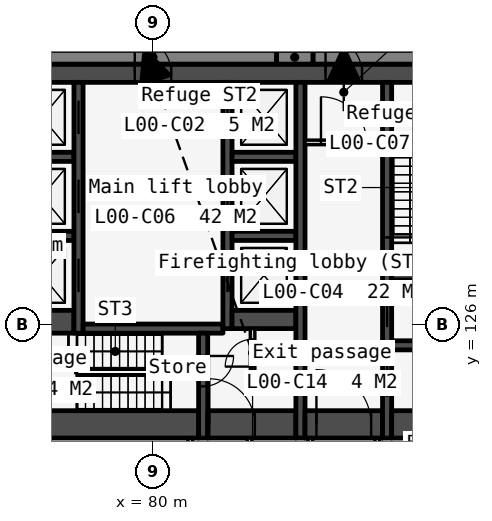
"""IFC4 building model, lengths in metres.
Left out: names, types, materials, properties, quantities, classifications, styles, units other than length and angle.
Written with IfcOpenShell. Run it as: python <this file> out.ifc"""

import sys

from ifc_helpers import new_model, si_unit, direction, frame, frame_2d, origin, place, context, subcontext, project, spatial, polyline, rectangle, outline, extrude, element, fill, save


model = new_model("IFC4")
c1 = context("Model", 3, precision=1e-05, world=origin(), true_north=direction((0.0, 1.0)))
c2 = subcontext(c1, "Body", "Model", "MODEL_VIEW")
j1 = project(units=[si_unit("LENGTHUNIT", "METRE"), si_unit("PLANEANGLEUNIT", "RADIAN")], contexts=[c1])
p1 = place(None, origin())
s1 = spatial("IfcSite", under=j1, at=p1, CompositionType="ELEMENT")
p2 = place(p1, origin())
s2 = spatial("IfcBuilding", under=s1, at=p2, CompositionType="ELEMENT")
p3 = place(p2, origin())
s3 = spatial("IfcBuildingStorey", under=s2, at=p3, CompositionType="ELEMENT", Elevation=0.0)
p4 = place(p3, frame((66.0, 134.25, 0.0), z_axis=(0.0, 0.0, 1.0), x_axis=(1.0, 0.0, 0.0)))
e1 = element("IfcWall", 1, at=p4, inside=s3, PredefinedType="SOLIDWALL", context=c2, shape_type="SweptSolid", body=[
    extrude(rectangle(XDim=28.0, YDim=0.6, at=frame_2d((14.0, 0.0))), origin(), (0.0, 0.0, 1.0), 7.2),
])
p5 = place(p4, frame((7.125, 0.0, 0.0)))
e2 = element("IfcOpeningElement", 2, at=p5, cuts=e1, PredefinedType="OPENING", context=c2, shape_type="SweptSolid", body=[
    extrude(rectangle(XDim=1.2, YDim=2.1, at=frame_2d((0.6, 1.05))), frame((0.0, 0.31, 0.0), z_axis=(0.0, -1.0, 0.0), x_axis=(1.0, 0.0, 0.0)), (0.0, 0.0, 1.0), 0.62),
])
p6 = place(p4, frame((19.675, 0.0, 0.0)))
e3 = element("IfcOpeningElement", 3, at=p6, cuts=e1, PredefinedType="OPENING", context=c2, shape_type="SweptSolid", body=[
    extrude(rectangle(XDim=1.2, YDim=2.1, at=frame_2d((0.6, 1.05))), frame((0.0, 0.31, 0.0), z_axis=(0.0, -1.0, 0.0), x_axis=(1.0, 0.0, 0.0)), (0.0, 0.0, 1.0), 0.62),
])
p7 = place(p4, frame((13.4, 0.0, 0.0)))
e4 = element("IfcOpeningElement", 4, at=p7, cuts=e1, PredefinedType="OPENING", context=c2, shape_type="SweptSolid", body=[
    extrude(rectangle(XDim=1.2, YDim=2.1, at=frame_2d((0.6, 1.05))), frame((0.0, 0.31, 0.0), z_axis=(0.0, -1.0, 0.0), x_axis=(1.0, 0.0, 0.0)), (0.0, 0.0, 1.0), 0.62),
])
for number, where, z_axis, x_axis in (
    (5, (75.3, 131.5, 0.0), (0.0, 0.0, 1.0), (1.0, 0.0, 0.0)),
    (6, (75.3, 128.9, 0.0), (0.0, 0.0, 1.0), (1.0, 0.0, 0.0)),
):
    element("IfcWall", number, at=place(p3, frame(where, z_axis=z_axis, x_axis=x_axis)), inside=s3, PredefinedType="SOLIDWALL", context=c2, shape_type="SweptSolid", body=[
        extrude(rectangle(XDim=2.1, YDim=0.3, at=frame_2d((1.05, 0.0))), origin(), (0.0, 0.0, 1.0), 7.2),
    ])
p8 = place(p3, frame((75.3, 126.075, 0.0), z_axis=(0.0, 0.0, 1.0), x_axis=(1.0, 0.0, 0.0)))
e7 = element("IfcWall", 7, at=p8, inside=s3, PredefinedType="SOLIDWALL", context=c2, shape_type="SweptSolid", body=[
    extrude(rectangle(XDim=2.1, YDim=0.75, at=frame_2d((1.05, 0.0))), origin(), (0.0, 0.0, 1.0), 7.2),
])
p9 = place(p3, frame((75.3, 122.7, 0.0), z_axis=(0.0, 0.0, 1.0), x_axis=(1.0, 0.0, 0.0)))
e8 = element("IfcWall", 8, at=p9, inside=s3, PredefinedType="SOLIDWALL", context=c2, shape_type="SweptSolid", body=[
    extrude(rectangle(XDim=6.2, YDim=0.9, at=frame_2d((3.1, 0.0))), origin(), (0.0, 0.0, 1.0), 7.2),
])
p10 = place(p3, frame((77.55, 133.95, 0.0), z_axis=(0.0, 0.0, 1.0), x_axis=(0.0, -1.0, 0.0)))
e9 = element("IfcWall", 9, at=p10, inside=s3, PredefinedType="SOLIDWALL", context=c2, shape_type="SweptSolid", body=[
    extrude(rectangle(XDim=8.25, YDim=0.3, at=frame_2d((4.125, 0.0))), origin(), (0.0, 0.0, 1.0), 7.2),
])
p11 = place(p10, frame((0.6, 0.0, 0.0)))
e10 = element("IfcOpeningElement", 10, at=p11, cuts=e9, PredefinedType="OPENING", context=c2, shape_type="SweptSolid", body=[
    extrude(rectangle(XDim=1.1, YDim=2.1, at=frame_2d((0.55, 1.05))), frame((0.0, 0.16, 0.0), z_axis=(0.0, -1.0, 0.0), x_axis=(1.0, 0.0, 0.0)), (0.0, 0.0, 1.0), 0.32),
])
p12 = place(p10, frame((3.2, 0.0, 0.0)))
e11 = element("IfcOpeningElement", 11, at=p12, cuts=e9, PredefinedType="OPENING", context=c2, shape_type="SweptSolid", body=[
    extrude(rectangle(XDim=1.1, YDim=2.1, at=frame_2d((0.55, 1.05))), frame((0.0, 0.16, 0.0), z_axis=(0.0, -1.0, 0.0), x_axis=(1.0, 0.0, 0.0)), (0.0, 0.0, 1.0), 0.32),
])
p13 = place(p10, frame((5.8, 0.0, 0.0)))
e12 = element("IfcOpeningElement", 12, at=p13, cuts=e9, PredefinedType="OPENING", context=c2, shape_type="SweptSolid", body=[
    extrude(rectangle(XDim=1.1, YDim=2.1, at=frame_2d((0.55, 1.05))), frame((0.0, 0.16, 0.0), z_axis=(0.0, -1.0, 0.0), x_axis=(1.0, 0.0, 0.0)), (0.0, 0.0, 1.0), 0.32),
])
p14 = place(p3, frame((77.7, 125.85, 0.0), z_axis=(0.0, 0.0, 1.0), x_axis=(1.0, 0.0, 0.0)))
e13 = element("IfcWall", 13, at=p14, inside=s3, PredefinedType="SOLIDWALL", context=c2, shape_type="SweptSolid", body=[
    extrude(rectangle(XDim=4.6, YDim=0.3, at=frame_2d((2.3, 0.0))), origin(), (0.0, 0.0, 1.0), 7.2),
])
p15 = place(p3, frame((81.225, 122.25, 0.0), z_axis=(0.0, 0.0, 1.0), x_axis=(0.0, -1.0, 0.0)))
e14 = element("IfcWall", 14, at=p15, inside=s3, PredefinedType="PARTITIONING", context=c2, shape_type="SweptSolid", body=[
    extrude(rectangle(XDim=2.1, YDim=0.15, at=frame_2d((1.05, 0.0))), origin(), (0.0, 0.0, 1.0), 7.2),
])
p16 = place(p3, frame((81.65, 125.7, 0.0), z_axis=(0.0, 0.0, 1.0), x_axis=(0.0, -1.0, 0.0)))
e15 = element("IfcWall", 15, at=p16, inside=s3, PredefinedType="SOLIDWALL", context=c2, shape_type="SweptSolid", body=[
    extrude(rectangle(XDim=3.45, YDim=0.3, at=frame_2d((1.725, 0.0))), origin(), (0.0, 0.0, 1.0), 7.2),
])
p17 = place(p16, frame((0.75, 0.0, 0.0)))
e16 = element("IfcOpeningElement", 16, at=p17, cuts=e15, PredefinedType="OPENING", context=c2, shape_type="SweptSolid", body=[
    extrude(rectangle(XDim=1.0, YDim=2.1, at=frame_2d((0.5, 1.05))), frame((0.0, 0.16, 0.0), z_axis=(0.0, -1.0, 0.0), x_axis=(1.0, 0.0, 0.0)), (0.0, 0.0, 1.0), 0.32),
])
p18 = place(p3, frame((81.8, 122.7, 0.0), z_axis=(0.0, 0.0, 1.0), x_axis=(1.0, 0.0, 0.0)))
e17 = element("IfcWall", 17, at=p18, inside=s3, PredefinedType="SOLIDWALL", context=c2, shape_type="SweptSolid", body=[
    extrude(rectangle(XDim=2.9, YDim=0.9, at=frame_2d((1.45, 0.0))), origin(), (0.0, 0.0, 1.0), 7.2),
])
p19 = place(p18, frame((0.05, 0.0, 0.0)))
e18 = element("IfcOpeningElement", 18, at=p19, cuts=e17, PredefinedType="OPENING", context=c2, shape_type="SweptSolid", body=[
    extrude(rectangle(XDim=1.5, YDim=2.1, at=frame_2d((0.75, 1.05))), frame((0.0, 0.46, 0.0), z_axis=(0.0, -1.0, 0.0), x_axis=(1.0, 0.0, 0.0)), (0.0, 0.0, 1.0), 0.92),
])
p20 = place(p3, frame((82.45, 133.95, 0.0), z_axis=(0.0, 0.0, 1.0), x_axis=(0.0, -1.0, 0.0)))
e19 = element("IfcWall", 19, at=p20, inside=s3, PredefinedType="SOLIDWALL", context=c2, shape_type="SweptSolid", body=[
    extrude(rectangle(XDim=8.1, YDim=0.3, at=frame_2d((4.05, 0.0))), origin(), (0.0, 0.0, 1.0), 7.2),
])
p21 = place(p20, frame((0.6, 0.0, 0.0)))
e20 = element("IfcOpeningElement", 20, at=p21, cuts=e19, PredefinedType="OPENING", context=c2, shape_type="SweptSolid", body=[
    extrude(rectangle(XDim=1.1, YDim=2.1, at=frame_2d((0.55, 1.05))), frame((0.0, 0.16, 0.0), z_axis=(0.0, -1.0, 0.0), x_axis=(1.0, 0.0, 0.0)), (0.0, 0.0, 1.0), 0.32),
])
p22 = place(p20, frame((3.2, 0.0, 0.0)))
e21 = element("IfcOpeningElement", 21, at=p22, cuts=e19, PredefinedType="OPENING", context=c2, shape_type="SweptSolid", body=[
    extrude(rectangle(XDim=1.1, YDim=2.1, at=frame_2d((0.55, 1.05))), frame((0.0, 0.16, 0.0), z_axis=(0.0, -1.0, 0.0), x_axis=(1.0, 0.0, 0.0)), (0.0, 0.0, 1.0), 0.32),
])
p23 = place(p20, frame((5.8, 0.0, 0.0)))
e22 = element("IfcOpeningElement", 22, at=p23, cuts=e19, PredefinedType="OPENING", context=c2, shape_type="SweptSolid", body=[
    extrude(rectangle(XDim=1.1, YDim=2.1, at=frame_2d((0.55, 1.05))), frame((0.0, 0.16, 0.0), z_axis=(0.0, -1.0, 0.0), x_axis=(1.0, 0.0, 0.0)), (0.0, 0.0, 1.0), 0.32),
])
for number, where, z_axis, x_axis in (
    (23, (82.6, 131.5, 0.0), (0.0, 0.0, 1.0), (1.0, 0.0, 0.0)),
    (24, (82.6, 128.9, 0.0), (0.0, 0.0, 1.0), (1.0, 0.0, 0.0)),
):
    element("IfcWall", number, at=place(p3, frame(where, z_axis=z_axis, x_axis=x_axis)), inside=s3, PredefinedType="SOLIDWALL", context=c2, shape_type="SweptSolid", body=[
        extrude(rectangle(XDim=2.1, YDim=0.3, at=frame_2d((1.05, 0.0))), origin(), (0.0, 0.0, 1.0), 7.2),
    ])
p24 = place(p3, frame((82.6, 126.15, 0.0), z_axis=(0.0, 0.0, 1.0), x_axis=(1.0, 0.0, 0.0)))
e25 = element("IfcWall", 25, at=p24, inside=s3, PredefinedType="SOLIDWALL", context=c2, shape_type="SweptSolid", body=[
    extrude(rectangle(XDim=2.1, YDim=0.6, at=frame_2d((1.05, 0.0))), origin(), (0.0, 0.0, 1.0), 7.2),
])
p25 = place(p3, frame((83.175, 122.25, 0.0), z_axis=(0.0, 0.0, 1.0), x_axis=(0.0, -1.0, 0.0)))
e26 = element("IfcWall", 26, at=p25, inside=s3, PredefinedType="PARTITIONING", context=c2, shape_type="SweptSolid", body=[
    extrude(rectangle(XDim=2.1, YDim=0.15, at=frame_2d((1.05, 0.0))), origin(), (0.0, 0.0, 1.0), 7.2),
])
p26 = place(p3, frame((83.275, 125.85, 0.0), z_axis=(0.0, 0.0, 1.0), x_axis=(0.0, -1.0, 0.0)))
e27 = element("IfcWall", 27, at=p26, inside=s3, PredefinedType="PARTITIONING", context=c2, shape_type="SweptSolid", body=[
    extrude(rectangle(XDim=1.75, YDim=0.15, at=frame_2d((0.875, 0.0))), origin(), (0.0, 0.0, 1.0), 7.2),
])
p27 = place(p26, frame((0.35, 0.0, 0.0)))
e28 = element("IfcOpeningElement", 28, at=p27, cuts=e27, PredefinedType="OPENING", context=c2, shape_type="SweptSolid", body=[
    extrude(rectangle(XDim=0.9, YDim=2.1, at=frame_2d((0.45, 1.05))), frame((0.0, 0.085, 0.0), z_axis=(0.0, -1.0, 0.0), x_axis=(1.0, 0.0, 0.0)), (0.0, 0.0, 1.0), 0.17),
])
p28 = place(p3, frame((83.35, 124.175, 0.0), z_axis=(0.0, 0.0, 1.0), x_axis=(1.0, 0.0, 0.0)))
e29 = element("IfcWall", 29, at=p28, inside=s3, PredefinedType="PARTITIONING", context=c2, shape_type="SweptSolid", body=[
    extrude(rectangle(XDim=1.35, YDim=0.15, at=frame_2d((0.675, 0.0))), origin(), (0.0, 0.0, 1.0), 7.2),
])
p29 = place(p3, frame((84.85, 133.95, 0.0), z_axis=(0.0, 0.0, 1.0), x_axis=(0.0, -1.0, 0.0)))
e30 = element("IfcWall", 30, at=p29, inside=s3, PredefinedType="SOLIDWALL", context=c2, shape_type="SweptSolid", body=[
    extrude(rectangle(XDim=11.7, YDim=0.3, at=frame_2d((5.85, 0.0))), origin(), (0.0, 0.0, 1.0), 7.2),
])
p30 = place(p3, frame((85.0, 131.975, 0.0), z_axis=(0.0, 0.0, 1.0), x_axis=(1.0, 0.0, 0.0)))
e31 = element("IfcWall", 31, at=p30, inside=s3, PredefinedType="PARTITIONING", context=c2, shape_type="SweptSolid", body=[
    extrude(rectangle(XDim=2.55, YDim=0.15, at=frame_2d((1.275, 0.0))), origin(), (0.0, 0.0, 1.0), 7.2),
])
p31 = place(p30, frame((0.525, 0.0, 0.0)))
e32 = element("IfcOpeningElement", 32, at=p31, cuts=e31, PredefinedType="OPENING", context=c2, shape_type="SweptSolid", body=[
    extrude(rectangle(XDim=1.5, YDim=2.1, at=frame_2d((0.75, 1.05))), frame((0.0, 0.085, 0.0), z_axis=(0.0, -1.0, 0.0), x_axis=(1.0, 0.0, 0.0)), (0.0, 0.0, 1.0), 0.17),
])
p32 = place(p3, frame((85.0, 122.7, 0.0), z_axis=(0.0, 0.0, 1.0), x_axis=(1.0, 0.0, 0.0)))
e33 = element("IfcWall", 33, at=p32, inside=s3, PredefinedType="SOLIDWALL", context=c2, shape_type="SweptSolid", body=[
    extrude(rectangle(XDim=2.55, YDim=0.9, at=frame_2d((1.275, 0.0))), origin(), (0.0, 0.0, 1.0), 7.2),
])
p33 = place(p32, frame((0.375, 0.0, 0.0)))
e34 = element("IfcOpeningElement", 34, at=p33, cuts=e33, PredefinedType="OPENING", context=c2, shape_type="SweptSolid", body=[
    extrude(rectangle(XDim=1.8, YDim=2.1, at=frame_2d((0.9, 1.05))), frame((0.0, 0.46, 0.0), z_axis=(0.0, -1.0, 0.0), x_axis=(1.0, 0.0, 0.0)), (0.0, 0.0, 1.0), 0.92),
])
p34 = place(p3, frame((85.175, 122.25, 0.0), z_axis=(0.0, 0.0, 1.0), x_axis=(0.0, -1.0, 0.0)))
e35 = element("IfcWall", 35, at=p34, inside=s3, PredefinedType="PARTITIONING", context=c2, shape_type="SweptSolid", body=[
    extrude(rectangle(XDim=2.1, YDim=0.15, at=frame_2d((1.05, 0.0))), origin(), (0.0, 0.0, 1.0), 7.2),
])
p35 = place(p34, frame((0.55, 0.0, 0.0)))
e36 = element("IfcOpeningElement", 36, at=p35, cuts=e35, PredefinedType="OPENING", context=c2, shape_type="SweptSolid", body=[
    extrude(rectangle(XDim=1.0, YDim=2.1, at=frame_2d((0.5, 1.05))), frame((0.0, 0.085, 0.0), z_axis=(0.0, -1.0, 0.0), x_axis=(1.0, 0.0, 0.0)), (0.0, 0.0, 1.0), 0.17),
])
p36 = place(p3, frame((87.375, 122.25, 0.0), z_axis=(0.0, 0.0, 1.0), x_axis=(0.0, -1.0, 0.0)))
e37 = element("IfcWall", 37, at=p36, inside=s3, PredefinedType="PARTITIONING", context=c2, shape_type="SweptSolid", body=[
    extrude(rectangle(XDim=2.1, YDim=0.15, at=frame_2d((1.05, 0.0))), origin(), (0.0, 0.0, 1.0), 7.2),
])
p37 = place(p3, frame((87.7, 133.95, 0.0), z_axis=(0.0, 0.0, 1.0), x_axis=(0.0, -1.0, 0.0)))
e38 = element("IfcWall", 38, at=p37, inside=s3, PredefinedType="SOLIDWALL", context=c2, shape_type="SweptSolid", body=[
    extrude(rectangle(XDim=11.7, YDim=0.3, at=frame_2d((5.85, 0.0))), origin(), (0.0, 0.0, 1.0), 7.2),
])
p38 = place(p37, frame((6.95, 0.0, 0.0)))
e39 = element("IfcOpeningElement", 39, at=p38, cuts=e38, PredefinedType="OPENING", context=c2, shape_type="SweptSolid", body=[
    extrude(rectangle(XDim=1.1, YDim=2.1, at=frame_2d((0.55, 1.05))), frame((0.0, 0.16, 0.0), z_axis=(0.0, -1.0, 0.0), x_axis=(1.0, 0.0, 0.0)), (0.0, 0.0, 1.0), 0.32),
])
p39 = place(p37, frame((5.1, 0.0, 0.0)))
e40 = element("IfcOpeningElement", 40, at=p39, cuts=e38, PredefinedType="OPENING", context=c2, shape_type="SweptSolid", body=[
    extrude(rectangle(XDim=1.0, YDim=2.1, at=frame_2d((0.5, 1.05))), frame((0.0, 0.16, 0.0), z_axis=(0.0, -1.0, 0.0), x_axis=(1.0, 0.0, 0.0)), (0.0, 0.0, 1.0), 0.32),
])
p40 = place(p37, frame((9.25, 0.0, 0.0)))
e41 = element("IfcOpeningElement", 41, at=p40, cuts=e38, PredefinedType="OPENING", context=c2, shape_type="SweptSolid", body=[
    extrude(rectangle(XDim=1.1, YDim=2.1, at=frame_2d((0.55, 1.05))), frame((0.0, 0.16, 0.0), z_axis=(0.0, -1.0, 0.0), x_axis=(1.0, 0.0, 0.0)), (0.0, 0.0, 1.0), 0.32),
])
for number, where, z_axis, x_axis in (
    (42, (87.85, 127.6, 0.0), (0.0, 0.0, 1.0), (1.0, 0.0, 0.0)),
    (43, (87.85, 125.3, 0.0), (0.0, 0.0, 1.0), (1.0, 0.0, 0.0)),
):
    element("IfcWall", number, at=place(p3, frame(where, z_axis=z_axis, x_axis=x_axis)), inside=s3, PredefinedType="SOLIDWALL", context=c2, shape_type="SweptSolid", body=[
        extrude(rectangle(XDim=2.55, YDim=0.3, at=frame_2d((1.275, 0.0))), origin(), (0.0, 0.0, 1.0), 7.2),
    ])
p41 = place(p3, frame((87.85, 122.7, 0.0), z_axis=(0.0, 0.0, 1.0), x_axis=(1.0, 0.0, 0.0)))
e44 = element("IfcWall", 44, at=p41, inside=s3, PredefinedType="SOLIDWALL", context=c2, shape_type="SweptSolid", body=[
    extrude(rectangle(XDim=2.55, YDim=0.9, at=frame_2d((1.275, 0.0))), origin(), (0.0, 0.0, 1.0), 7.2),
])
p42 = place(p3, frame((93.382, 134.775, -0.3), z_axis=(0.0, 0.0, 1.0), x_axis=(-1.0, 0.0, 0.0)))
e45 = element("IfcWall", 45, at=p42, inside=s3, PredefinedType="SOLIDWALL", context=c2, shape_type="SweptSolid", body=[
    extrude(outline(polyline([(0.0, 0.0), (6.507, 0.0), (6.507, 2.4), (7.707, 2.4), (7.707, 0.0), (8.121, 0.0), (8.121, 6.812), (0.0, 6.812), (0.0, 0.0)])), frame((0.0, 0.225, 0.0), z_axis=(0.0, -1.0, 0.0), x_axis=(1.0, 0.0, 0.0)), (0.0, 0.0, 1.0), 0.45),
])
p43 = place(p3, frame((85.261, 134.775, -0.3), z_axis=(0.0, 0.0, 1.0), x_axis=(-1.0, 0.0, 0.0)))
e46 = element("IfcWall", 46, at=p43, inside=s3, PredefinedType="SOLIDWALL", context=c2, shape_type="SweptSolid", body=[
    extrude(rectangle(XDim=1.2, YDim=0.45, at=frame_2d((0.6, 0.0))), origin(), (0.0, 0.0, 1.0), 6.812),
])
p44 = place(p3, frame((84.061, 134.775, -0.3), z_axis=(0.0, 0.0, 1.0), x_axis=(-1.0, 0.0, 0.0)))
e47 = element("IfcWall", 47, at=p44, inside=s3, PredefinedType="SOLIDWALL", context=c2, shape_type="SweptSolid", body=[
    extrude(outline(polyline([(0.0, 0.0), (3.461, 0.0), (3.461, 2.4), (4.661, 2.4), (4.661, 0.0), (8.121, 0.0), (8.121, 6.812), (0.0, 6.812), (0.0, 0.0)])), frame((0.0, 0.225, 0.0), z_axis=(0.0, -1.0, 0.0), x_axis=(1.0, 0.0, 0.0)), (0.0, 0.0, 1.0), 0.45),
])
p45 = place(p11, origin())
e48 = element("IfcDoor", 48, at=p45, inside=s3, OperationType="SLIDING_TO_RIGHT", PredefinedType="DOOR", context=c2, shape_type="SweptSolid", body=[
    extrude(rectangle(XDim=1.1, YDim=2.1, at=frame_2d((0.55, 1.05))), frame((0.0, 0.025, 0.0), z_axis=(0.0, -1.0, 0.0), x_axis=(1.0, 0.0, 0.0)), (0.0, 0.0, 1.0), 0.05),
])
fill(e10, e48)
p46 = place(p12, origin())
e49 = element("IfcDoor", 49, at=p46, inside=s3, OperationType="SLIDING_TO_RIGHT", PredefinedType="DOOR", context=c2, shape_type="SweptSolid", body=[
    extrude(rectangle(XDim=1.1, YDim=2.1, at=frame_2d((0.55, 1.05))), frame((0.0, 0.025, 0.0), z_axis=(0.0, -1.0, 0.0), x_axis=(1.0, 0.0, 0.0)), (0.0, 0.0, 1.0), 0.05),
])
fill(e11, e49)
p47 = place(p13, origin())
e50 = element("IfcDoor", 50, at=p47, inside=s3, OperationType="SLIDING_TO_RIGHT", PredefinedType="DOOR", context=c2, shape_type="SweptSolid", body=[
    extrude(rectangle(XDim=1.1, YDim=2.1, at=frame_2d((0.55, 1.05))), frame((0.0, 0.025, 0.0), z_axis=(0.0, -1.0, 0.0), x_axis=(1.0, 0.0, 0.0)), (0.0, 0.0, 1.0), 0.05),
])
fill(e12, e50)
p48 = place(p21, origin())
e51 = element("IfcDoor", 51, at=p48, inside=s3, OperationType="SLIDING_TO_LEFT", PredefinedType="DOOR", context=c2, shape_type="SweptSolid", body=[
    extrude(rectangle(XDim=1.1, YDim=2.1, at=frame_2d((0.55, 1.05))), frame((0.0, 0.025, 0.0), z_axis=(0.0, -1.0, 0.0), x_axis=(1.0, 0.0, 0.0)), (0.0, 0.0, 1.0), 0.05),
])
fill(e20, e51)
p49 = place(p22, origin())
e52 = element("IfcDoor", 52, at=p49, inside=s3, OperationType="SLIDING_TO_LEFT", PredefinedType="DOOR", context=c2, shape_type="SweptSolid", body=[
    extrude(rectangle(XDim=1.1, YDim=2.1, at=frame_2d((0.55, 1.05))), frame((0.0, 0.025, 0.0), z_axis=(0.0, -1.0, 0.0), x_axis=(1.0, 0.0, 0.0)), (0.0, 0.0, 1.0), 0.05),
])
fill(e21, e52)
p50 = place(p23, origin())
e53 = element("IfcDoor", 53, at=p50, inside=s3, OperationType="SLIDING_TO_LEFT", PredefinedType="DOOR", context=c2, shape_type="SweptSolid", body=[
    extrude(rectangle(XDim=1.1, YDim=2.1, at=frame_2d((0.55, 1.05))), frame((0.0, 0.025, 0.0), z_axis=(0.0, -1.0, 0.0), x_axis=(1.0, 0.0, 0.0)), (0.0, 0.0, 1.0), 0.05),
])
fill(e22, e53)
p51 = place(p38, origin())
e54 = element("IfcDoor", 54, at=p51, inside=s3, OperationType="SLIDING_TO_LEFT", PredefinedType="DOOR", context=c2, shape_type="SweptSolid", body=[
    extrude(rectangle(XDim=1.1, YDim=2.1, at=frame_2d((0.55, 1.05))), frame((0.0, 0.025, 0.0), z_axis=(0.0, -1.0, 0.0), x_axis=(1.0, 0.0, 0.0)), (0.0, 0.0, 1.0), 0.05),
])
fill(e39, e54)
p52 = place(p33, origin())
e55 = element("IfcDoor", 55, at=p52, inside=s3, OperationType="DOUBLE_DOOR_DOUBLE_SWING", PredefinedType="DOOR", context=c2, shape_type="SweptSolid", body=[
    extrude(rectangle(XDim=1.8, YDim=2.1, at=frame_2d((0.9, 1.05))), frame((0.0, 0.025, 0.0), z_axis=(0.0, -1.0, 0.0), x_axis=(1.0, 0.0, 0.0)), (0.0, 0.0, 1.0), 0.05),
])
fill(e34, e55)
p53 = place(p19, origin())
e56 = element("IfcDoor", 56, at=p53, inside=s3, OperationType="DOUBLE_DOOR_DOUBLE_SWING", PredefinedType="DOOR", context=c2, shape_type="SweptSolid", body=[
    extrude(rectangle(XDim=1.5, YDim=2.1, at=frame_2d((0.75, 1.05))), frame((0.0, 0.025, 0.0), z_axis=(0.0, -1.0, 0.0), x_axis=(1.0, 0.0, 0.0)), (0.0, 0.0, 1.0), 0.05),
])
fill(e18, e56)
p54 = place(p27, origin())
e57 = element("IfcDoor", 57, at=p54, inside=s3, OperationType="SINGLE_SWING_RIGHT", PredefinedType="DOOR", context=c2, shape_type="SweptSolid", body=[
    extrude(rectangle(XDim=0.9, YDim=2.1, at=frame_2d((0.45, 1.05))), frame((0.0, 0.025, 0.0), z_axis=(0.0, -1.0, 0.0), x_axis=(1.0, 0.0, 0.0)), (0.0, 0.0, 1.0), 0.05),
])
fill(e28, e57)
p55 = place(p31, origin())
e58 = element("IfcDoor", 58, at=p55, inside=s3, OperationType="DOUBLE_DOOR_DOUBLE_SWING", PredefinedType="DOOR", context=c2, shape_type="SweptSolid", body=[
    extrude(rectangle(XDim=1.5, YDim=2.1, at=frame_2d((0.75, 1.05))), frame((0.0, 0.025, 0.0), z_axis=(0.0, -1.0, 0.0), x_axis=(1.0, 0.0, 0.0)), (0.0, 0.0, 1.0), 0.05),
])
fill(e32, e58)
p56 = place(p39, origin())
e59 = element("IfcDoor", 59, at=p56, inside=s3, OperationType="SINGLE_SWING_LEFT", PredefinedType="DOOR", context=c2, shape_type="SweptSolid", body=[
    extrude(rectangle(XDim=1.0, YDim=2.1, at=frame_2d((0.5, 1.05))), frame((0.0, 0.025, 0.0), z_axis=(0.0, -1.0, 0.0), x_axis=(1.0, 0.0, 0.0)), (0.0, 0.0, 1.0), 0.05),
])
fill(e40, e59)
p57 = place(p17, origin())
e60 = element("IfcDoor", 60, at=p57, inside=s3, OperationType="SINGLE_SWING_LEFT", PredefinedType="DOOR", context=c2, shape_type="SweptSolid", body=[
    extrude(rectangle(XDim=1.0, YDim=2.1, at=frame_2d((0.5, 1.05))), frame((0.0, 0.025, 0.0), z_axis=(0.0, -1.0, 0.0), x_axis=(1.0, 0.0, 0.0)), (0.0, 0.0, 1.0), 0.05),
])
fill(e16, e60)
p58 = place(p40, origin())
e61 = element("IfcDoor", 61, at=p58, inside=s3, OperationType="SLIDING_TO_LEFT", PredefinedType="DOOR", context=c2, shape_type="SweptSolid", body=[
    extrude(rectangle(XDim=1.1, YDim=2.1, at=frame_2d((0.55, 1.05))), frame((0.0, 0.025, 0.0), z_axis=(0.0, -1.0, 0.0), x_axis=(1.0, 0.0, 0.0)), (0.0, 0.0, 1.0), 0.05),
])
fill(e41, e61)
p59 = place(p6, origin())
e62 = element("IfcDoor", 62, at=p59, inside=s3, OperationType="SINGLE_SWING_LEFT", PredefinedType="DOOR", context=c2, shape_type="SweptSolid", body=[
    extrude(rectangle(XDim=1.2, YDim=2.1, at=frame_2d((0.6, 1.05))), frame((0.0, 0.025, 0.0), z_axis=(0.0, -1.0, 0.0), x_axis=(1.0, 0.0, 0.0)), (0.0, 0.0, 1.0), 0.05),
])
fill(e3, e62)
p60 = place(p7, origin())
e63 = element("IfcDoor", 63, at=p60, inside=s3, OperationType="SINGLE_SWING_LEFT", PredefinedType="DOOR", context=c2, shape_type="SweptSolid", body=[
    extrude(rectangle(XDim=1.2, YDim=2.1, at=frame_2d((0.6, 1.05))), frame((0.0, 0.025, 0.0), z_axis=(0.0, -1.0, 0.0), x_axis=(1.0, 0.0, 0.0)), (0.0, 0.0, 1.0), 0.05),
])
fill(e4, e63)
save(model, sys.argv[1])
